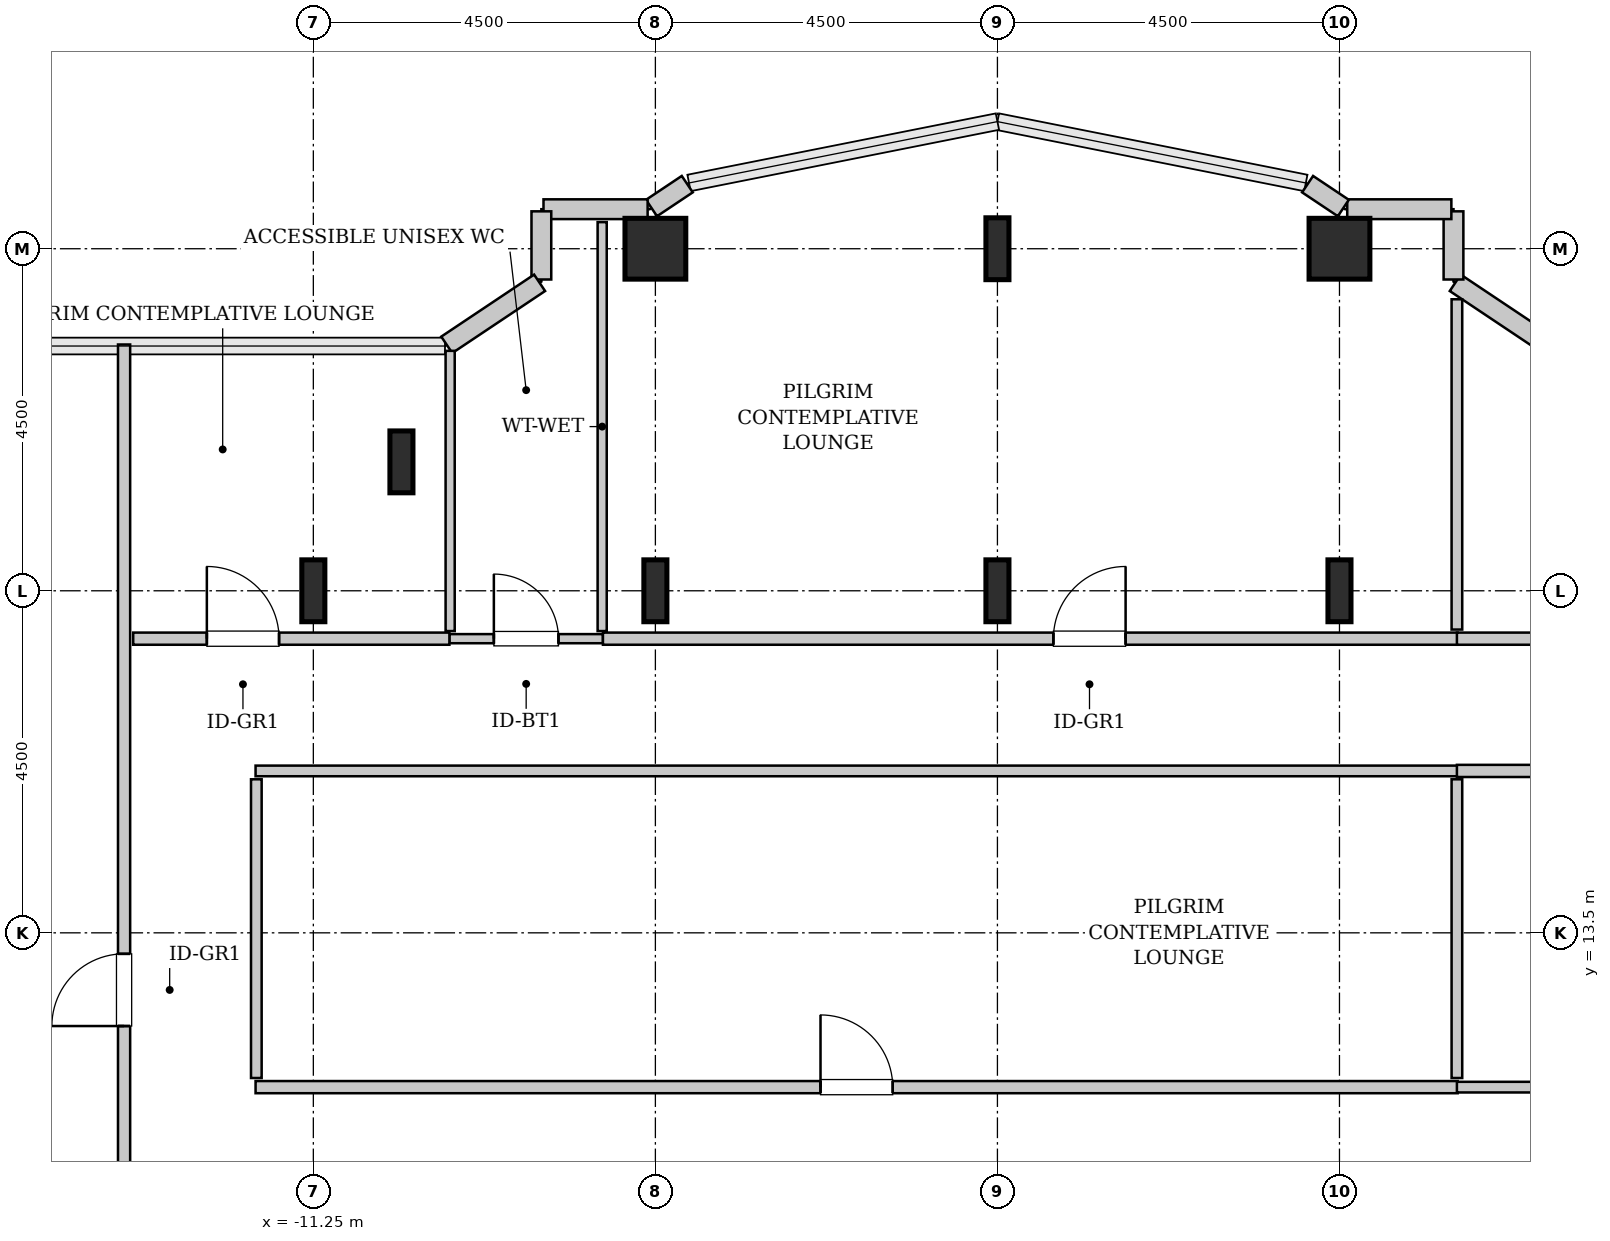
"""IFC4 building model, lengths in metres.
Left out: names, types, materials, properties, quantities, classifications, styles, units other than length and angle.
Written with IfcOpenShell. Run it as: python <this file> out.ifc"""

import sys

from ifc_helpers import new_model, si_unit, direction, frame, frame_2d, origin, origin_2d, place, context, subcontext, project, spatial, rectangle, hollow_rectangle, i_section, extrude, source, transform, mapped, element, fill, save


model = new_model("IFC4")
c1 = context("Model", 3, precision=1e-05, world=origin(), true_north=direction((0.0, 1.0)))
c2 = subcontext(c1, "Body", "Model", "MODEL_VIEW")
j1 = project(units=[si_unit("LENGTHUNIT", "METRE"), si_unit("PLANEANGLEUNIT", "RADIAN")], contexts=[c1])
p1 = place(None, origin())
s1 = spatial("IfcSite", under=j1, at=p1, CompositionType="ELEMENT")
p2 = place(p1, origin())
s2 = spatial("IfcBuilding", under=s1, at=p2, CompositionType="ELEMENT")
p3 = place(p2, frame((0.0, 0.0, 198.2)))
s3 = spatial("IfcBuildingStorey", under=s2, at=p3, CompositionType="ELEMENT", Elevation=198.2)
m1 = source(origin(), c2, "Body", "SweptSolid", [
    extrude(i_section(OverallWidth=0.303, OverallDepth=0.814, WebThickness=0.021, FlangeThickness=0.04, FilletRadius=0.03, at=origin_2d()), origin(), (0.0, 0.0, 1.0), 3.8),
])
for number, where, z_axis, x_axis in (
    (1, (-11.25, 18.0, 0.0), (0.0, 0.0, 1.0), (1.0, 0.0, 0.0)),
    (2, (-10.091, 19.696, 0.0), (0.0, 0.0, 1.0), (1.0, 0.0, 0.0)),
    (3, (-6.75, 18.0, 0.0), (0.0, 0.0, 1.0), (1.0, 0.0, 0.0)),
):
    element("IfcColumn", number, at=place(p3, frame(where, z_axis=z_axis, x_axis=x_axis)), inside=s3, PredefinedType="COLUMN", context=c2, shape_type="MappedRepresentation", body=[
        mapped(m1, transform((0.0, 0.0, 0.0), x_axis=(1.0, 0.0, 0.0), y_axis=(0.0, 1.0, 0.0), z_axis=(0.0, 0.0, 1.0), scale=1.0)),
    ])
m2 = source(origin(), c2, "Body", "SweptSolid", [
    extrude(hollow_rectangle(XDim=0.8, YDim=0.8, WallThickness=0.04, InnerFilletRadius=0.04, OuterFilletRadius=0.08, at=origin_2d()), origin(), (0.0, 0.0, 1.0), 3.8),
])
p4 = place(p3, frame((-6.75, 22.5, 0.0), z_axis=(0.0, 0.0, 1.0), x_axis=(1.0, 0.0, 0.0)))
e4 = element("IfcColumn", 4, at=p4, inside=s3, PredefinedType="COLUMN", context=c2, shape_type="MappedRepresentation", body=[
    mapped(m2, transform((0.0, 0.0, 0.0), x_axis=(1.0, 0.0, 0.0), y_axis=(0.0, 1.0, 0.0), z_axis=(0.0, 0.0, 1.0), scale=1.0)),
])
for number, where, z_axis, x_axis in (
    (5, (-2.25, 18.0, 0.0), (0.0, 0.0, 1.0), (1.0, 0.0, 0.0)),
    (6, (-2.25, 22.5, 0.0), (0.0, 0.0, 1.0), (1.0, 0.0, 0.0)),
    (7, (2.25, 18.0, 0.0), (0.0, 0.0, 1.0), (1.0, 0.0, 0.0)),
):
    element("IfcColumn", number, at=place(p3, frame(where, z_axis=z_axis, x_axis=x_axis)), inside=s3, PredefinedType="COLUMN", context=c2, shape_type="MappedRepresentation", body=[
        mapped(m1, transform((0.0, 0.0, 0.0), x_axis=(1.0, 0.0, 0.0), y_axis=(0.0, 1.0, 0.0), z_axis=(0.0, 0.0, 1.0), scale=1.0)),
    ])
p5 = place(p3, frame((2.25, 22.5, 0.0), z_axis=(0.0, 0.0, 1.0), x_axis=(1.0, 0.0, 0.0)))
e8 = element("IfcColumn", 8, at=p5, inside=s3, PredefinedType="COLUMN", context=c2, shape_type="MappedRepresentation", body=[
    mapped(m2, transform((0.0, 0.0, 0.0), x_axis=(1.0, 0.0, 0.0), y_axis=(0.0, 1.0, 0.0), z_axis=(0.0, 0.0, 1.0), scale=1.0)),
])
m3 = source(origin(), c2, "Body", "SweptSolid", [
    extrude(rectangle(XDim=1.469, YDim=0.26, at=frame_2d((0.734, 0.0))), origin(), (0.0, 0.0, 1.0), 3.5),
])
p6 = place(p3, frame((4.995, 21.236, 0.0), z_axis=(0.0, 0.0, 1.0), x_axis=(-0.831461760506, 0.555581983884, 0.0)))
e9 = element("IfcWall", 9, at=p6, inside=s3, PredefinedType="SOLIDWALL", context=c2, shape_type="MappedRepresentation", body=[
    mapped(m3, transform((0.0, 0.0, 0.0), x_axis=(1.0, 0.0, 0.0), y_axis=(0.0, 1.0, 0.0), z_axis=(0.0, 0.0, 1.0), scale=1.0)),
])
m4 = source(origin(), c2, "Body", "SweptSolid", [
    extrude(rectangle(XDim=0.897, YDim=0.26, at=frame_2d((0.448, 0.0))), origin(), (0.0, 0.0, 1.0), 3.5),
])
p7 = place(p3, frame((3.75, 22.095, 0.0), z_axis=(0.0, 0.0, 1.0), x_axis=(0.0, 1.0, 0.0)))
e10 = element("IfcWall", 10, at=p7, inside=s3, PredefinedType="SOLIDWALL", context=c2, shape_type="MappedRepresentation", body=[
    mapped(m4, transform((0.0, 0.0, 0.0), x_axis=(1.0, 0.0, 0.0), y_axis=(0.0, 1.0, 0.0), z_axis=(0.0, 0.0, 1.0), scale=1.0)),
])
m5 = source(origin(), c2, "Body", "SweptSolid", [
    extrude(rectangle(XDim=1.37, YDim=0.26, at=frame_2d((0.685, 0.0))), origin(), (0.0, 0.0, 1.0), 3.5),
])
p8 = place(p3, frame((3.722, 23.02, 0.0), z_axis=(0.0, 0.0, 1.0), x_axis=(-1.0, 0.0, 0.0)))
e11 = element("IfcWall", 11, at=p8, inside=s3, PredefinedType="SOLIDWALL", context=c2, shape_type="MappedRepresentation", body=[
    mapped(m5, transform((0.0, 0.0, 0.0), x_axis=(1.0, 0.0, 0.0), y_axis=(0.0, 1.0, 0.0), z_axis=(0.0, 0.0, 1.0), scale=1.0)),
])
m6 = source(origin(), c2, "Body", "SweptSolid", [
    extrude(rectangle(XDim=0.565, YDim=0.26, at=frame_2d((0.283, 0.0))), origin(), (0.0, 0.0, 1.0), 3.5),
])
for number, where, z_axis, x_axis in (
    (12, (2.301, 23.036, 0.0), (0.0, 0.0, 1.0), (-0.832, 0.555, 0.0)),
    (13, (-6.331, 23.35, 0.0), (0.0, 0.0, 1.0), (-0.832, -0.555, 0.0)),
):
    element("IfcWall", number, at=place(p3, frame(where, z_axis=z_axis, x_axis=x_axis)), inside=s3, PredefinedType="SOLIDWALL", context=c2, shape_type="MappedRepresentation", body=[
        mapped(m6, transform((0.0, 0.0, 0.0), x_axis=(1.0, 0.0, 0.0), y_axis=(0.0, 1.0, 0.0), z_axis=(0.0, 0.0, 1.0), scale=1.0)),
    ])
p9 = place(p3, frame((-6.852, 23.02, 0.0), z_axis=(0.0, 0.0, 1.0), x_axis=(-1.0, 0.0, 0.0)))
e14 = element("IfcWall", 14, at=p9, inside=s3, PredefinedType="SOLIDWALL", context=c2, shape_type="MappedRepresentation", body=[
    mapped(m5, transform((0.0, 0.0, 0.0), x_axis=(1.0, 0.0, 0.0), y_axis=(0.0, 1.0, 0.0), z_axis=(0.0, 0.0, 1.0), scale=1.0)),
])
p10 = place(p3, frame((-8.25, 22.992, 0.0), z_axis=(0.0, 0.0, 1.0), x_axis=(0.0, -1.0, 0.0)))
e15 = element("IfcWall", 15, at=p10, inside=s3, PredefinedType="SOLIDWALL", context=c2, shape_type="MappedRepresentation", body=[
    mapped(m4, transform((0.0, 0.0, 0.0), x_axis=(1.0, 0.0, 0.0), y_axis=(0.0, 1.0, 0.0), z_axis=(0.0, 0.0, 1.0), scale=1.0)),
])
p11 = place(p3, frame((-8.273, 22.052, 0.0), z_axis=(0.0, 0.0, 1.0), x_axis=(-0.831461760506, -0.555581983884, 0.0)))
e16 = element("IfcWall", 16, at=p11, inside=s3, PredefinedType="SOLIDWALL", context=c2, shape_type="MappedRepresentation", body=[
    mapped(m3, transform((0.0, 0.0, 0.0), x_axis=(1.0, 0.0, 0.0), y_axis=(0.0, 1.0, 0.0), z_axis=(0.0, 0.0, 1.0), scale=1.0)),
])
m7 = source(origin(), c2, "Body", "SweptSolid", [
    extrude(rectangle(XDim=2.02, YDim=0.12, at=frame_2d((1.01, 0.0))), origin(), (0.0, 0.0, 1.0), 3.485),
])
p12 = place(p3, frame((-9.46, 17.37, 0.0), z_axis=(0.0, 0.0, 1.0), x_axis=(1.0, 0.0, 0.0)))
e17 = element("IfcWall", 17, at=p12, inside=s3, PredefinedType="PLUMBINGWALL", context=c2, shape_type="MappedRepresentation", body=[
    mapped(m7, transform((0.0, 0.0, 0.0), x_axis=(1.0, 0.0, 0.0), y_axis=(0.0, 1.0, 0.0), z_axis=(0.0, 0.0, 1.0), scale=1.0)),
])
p13 = place(p12, frame((0.585, 0.0, 0.0)))
e18 = element("IfcOpeningElement", 18, at=p13, cuts=e17, PredefinedType="OPENING", context=c2, shape_type="SweptSolid", body=[
    extrude(rectangle(XDim=0.85, YDim=2.1, at=frame_2d((0.425, 1.05))), frame((0.0, 0.07, 0.0), z_axis=(0.0, -1.0, 0.0), x_axis=(1.0, 0.0, 0.0)), (0.0, 0.0, 1.0), 0.14),
])
m8 = source(origin(), c2, "Body", "SweptSolid", [
    extrude(rectangle(XDim=5.38, YDim=0.12, at=frame_2d((2.69, 0.0))), origin(), (0.0, 0.0, 1.0), 3.485),
])
p14 = place(p3, frame((-7.45, 17.47, 0.0), z_axis=(0.0, 0.0, 1.0), x_axis=(0.0, 1.0, 0.0)))
e19 = element("IfcWall", 19, at=p14, inside=s3, PredefinedType="PLUMBINGWALL", context=c2, shape_type="MappedRepresentation", body=[
    mapped(m8, transform((0.0, 0.0, 0.0), x_axis=(1.0, 0.0, 0.0), y_axis=(0.0, 1.0, 0.0), z_axis=(0.0, 0.0, 1.0), scale=1.0)),
])
m9 = source(origin(), c2, "Body", "SweptSolid", [
    extrude(rectangle(XDim=3.687, YDim=0.12, at=frame_2d((1.843, 0.0))), origin(), (0.0, 0.0, 1.0), 3.485),
])
p15 = place(p3, frame((-9.45, 17.47, 0.0), z_axis=(0.0, 0.0, 1.0), x_axis=(0.0, 1.0, 0.0)))
e20 = element("IfcWall", 20, at=p15, inside=s3, PredefinedType="PLUMBINGWALL", context=c2, shape_type="MappedRepresentation", body=[
    mapped(m9, transform((0.0, 0.0, 0.0), x_axis=(1.0, 0.0, 0.0), y_axis=(0.0, 1.0, 0.0), z_axis=(0.0, 0.0, 1.0), scale=1.0)),
])
m10 = source(origin(), c2, "Body", "SweptSolid", [
    extrude(rectangle(XDim=13.153, YDim=0.16, at=frame_2d((6.576, 0.0))), origin(), (0.0, 0.0, 1.0), 3.485),
])
p16 = place(p3, frame((-13.74, 8.087, 0.0), z_axis=(0.0, 0.0, 1.0), x_axis=(0.0, 1.0, 0.0)))
e21 = element("IfcWall", 21, at=p16, inside=s3, PredefinedType="PARTITIONING", context=c2, shape_type="MappedRepresentation", body=[
    mapped(m10, transform((0.0, 0.0, 0.0), x_axis=(1.0, 0.0, 0.0), y_axis=(0.0, 1.0, 0.0), z_axis=(0.0, 0.0, 1.0), scale=1.0)),
])
p17 = place(p16, frame((4.186, 0.0, 0.0)))
e22 = element("IfcOpeningElement", 22, at=p17, cuts=e21, PredefinedType="OPENING", context=c2, shape_type="SweptSolid", body=[
    extrude(rectangle(XDim=0.95, YDim=2.1, at=frame_2d((0.475, 1.05))), frame((0.0, 0.09, 0.0), z_axis=(0.0, -1.0, 0.0), x_axis=(1.0, 0.0, 0.0)), (0.0, 0.0, 1.0), 0.18),
])
m11 = source(origin(), c2, "Body", "SweptSolid", [
    extrude(rectangle(XDim=15.815, YDim=0.16, at=frame_2d((7.907, 0.0))), origin(), (0.0, 0.0, 1.0), 3.485),
])
p18 = place(p3, frame((-12.01, 11.47, 0.0), z_axis=(0.0, 0.0, 1.0), x_axis=(1.0, 0.0, 0.0)))
e23 = element("IfcWall", 23, at=p18, inside=s3, PredefinedType="PARTITIONING", context=c2, shape_type="MappedRepresentation", body=[
    mapped(m11, transform((0.0, 0.0, 0.0), x_axis=(1.0, 0.0, 0.0), y_axis=(0.0, 1.0, 0.0), z_axis=(0.0, 0.0, 1.0), scale=1.0)),
])
p19 = place(p18, frame((7.433, 0.0, 0.0)))
e24 = element("IfcOpeningElement", 24, at=p19, cuts=e23, PredefinedType="OPENING", context=c2, shape_type="SweptSolid", body=[
    extrude(rectangle(XDim=0.95, YDim=2.1, at=frame_2d((0.475, 1.05))), frame((0.0, 0.09, 0.0), z_axis=(0.0, -1.0, 0.0), x_axis=(1.0, 0.0, 0.0)), (0.0, 0.0, 1.0), 0.18),
])
m12 = source(origin(), c2, "Body", "SweptSolid", [
    extrude(rectangle(XDim=15.815, YDim=0.14, at=frame_2d((7.907, 0.0))), origin(), (0.0, 0.0, 1.0), 3.485),
])
p20 = place(p3, frame((-12.01, 15.63, 0.0), z_axis=(0.0, 0.0, 1.0), x_axis=(1.0, 0.0, 0.0)))
e25 = element("IfcWall", 25, at=p20, inside=s3, PredefinedType="PARTITIONING", context=c2, shape_type="MappedRepresentation", body=[
    mapped(m12, transform((0.0, 0.0, 0.0), x_axis=(1.0, 0.0, 0.0), y_axis=(0.0, 1.0, 0.0), z_axis=(0.0, 0.0, 1.0), scale=1.0)),
])
m13 = source(origin(), c2, "Body", "SweptSolid", [
    extrude(rectangle(XDim=3.93, YDim=0.14, at=frame_2d((1.965, 0.0))), origin(), (0.0, 0.0, 1.0), 3.485),
])
for number, where, z_axis, x_axis in (
    (26, (-12.0, 11.59, 0.0), (0.0, 0.0, 1.0), (0.0, 1.0, 0.0)),
    (27, (3.795, 11.59, 0.0), (0.0, 0.0, 1.0), (0.0, 1.0, 0.0)),
):
    element("IfcWall", number, at=place(p3, frame(where, z_axis=z_axis, x_axis=x_axis)), inside=s3, PredefinedType="PARTITIONING", context=c2, shape_type="MappedRepresentation", body=[
        mapped(m13, transform((0.0, 0.0, 0.0), x_axis=(1.0, 0.0, 0.0), y_axis=(0.0, 1.0, 0.0), z_axis=(0.0, 0.0, 1.0), scale=1.0)),
    ])
m14 = source(origin(), c2, "Body", "SweptSolid", [
    extrude(rectangle(XDim=11.245, YDim=0.16, at=frame_2d((5.623, 0.0))), origin(), (0.0, 0.0, 1.0), 3.485),
])
p21 = place(p3, frame((-7.44, 17.37, 0.0), z_axis=(0.0, 0.0, 1.0), x_axis=(1.0, 0.0, 0.0)))
e28 = element("IfcWall", 28, at=p21, inside=s3, PredefinedType="PARTITIONING", context=c2, shape_type="MappedRepresentation", body=[
    mapped(m14, transform((0.0, 0.0, 0.0), x_axis=(1.0, 0.0, 0.0), y_axis=(0.0, 1.0, 0.0), z_axis=(0.0, 0.0, 1.0), scale=1.0)),
])
p22 = place(p21, frame((5.926, 0.0, 0.0)))
e29 = element("IfcOpeningElement", 29, at=p22, cuts=e28, PredefinedType="OPENING", context=c2, shape_type="SweptSolid", body=[
    extrude(rectangle(XDim=0.95, YDim=2.1, at=frame_2d((0.475, 1.05))), frame((0.0, 0.09, 0.0), z_axis=(0.0, -1.0, 0.0), x_axis=(1.0, 0.0, 0.0)), (0.0, 0.0, 1.0), 0.18),
])
m15 = source(origin(), c2, "Body", "SweptSolid", [
    extrude(rectangle(XDim=4.345, YDim=0.14, at=frame_2d((2.173, 0.0))), origin(), (0.0, 0.0, 1.0), 3.485),
])
p23 = place(p3, frame((3.795, 17.49, 0.0), z_axis=(0.0, 0.0, 1.0), x_axis=(0.0, 1.0, 0.0)))
e30 = element("IfcWall", 30, at=p23, inside=s3, PredefinedType="PARTITIONING", context=c2, shape_type="MappedRepresentation", body=[
    mapped(m15, transform((0.0, 0.0, 0.0), x_axis=(1.0, 0.0, 0.0), y_axis=(0.0, 1.0, 0.0), z_axis=(0.0, 0.0, 1.0), scale=1.0)),
])
m16 = source(origin(), c2, "Body", "SweptSolid", [
    extrude(rectangle(XDim=4.16, YDim=0.16, at=frame_2d((2.08, 0.0))), origin(), (0.0, 0.0, 1.0), 3.485),
])
p24 = place(p3, frame((-13.62, 17.37, 0.0), z_axis=(0.0, 0.0, 1.0), x_axis=(1.0, 0.0, 0.0)))
e31 = element("IfcWall", 31, at=p24, inside=s3, PredefinedType="PARTITIONING", context=c2, shape_type="MappedRepresentation", body=[
    mapped(m16, transform((0.0, 0.0, 0.0), x_axis=(1.0, 0.0, 0.0), y_axis=(0.0, 1.0, 0.0), z_axis=(0.0, 0.0, 1.0), scale=1.0)),
])
p25 = place(p24, frame((0.969, 0.0, 0.0)))
e32 = element("IfcOpeningElement", 32, at=p25, cuts=e31, PredefinedType="OPENING", context=c2, shape_type="SweptSolid", body=[
    extrude(rectangle(XDim=0.95, YDim=2.1, at=frame_2d((0.475, 1.05))), frame((0.0, 0.09, 0.0), z_axis=(0.0, -1.0, 0.0), x_axis=(1.0, 0.0, 0.0)), (0.0, 0.0, 1.0), 0.18),
])
m17 = source(origin(), c2, "Body", "SweptSolid", [
    extrude(rectangle(XDim=9.825, YDim=0.16, at=frame_2d((4.913, 0.0))), origin(), (0.0, 0.0, 1.0), 3.485),
])
p26 = place(p3, frame((3.795, 17.37, 0.0), z_axis=(0.0, 0.0, 1.0), x_axis=(1.0, 0.0, 0.0)))
e33 = element("IfcWall", 33, at=p26, inside=s3, PredefinedType="PARTITIONING", context=c2, shape_type="MappedRepresentation", body=[
    mapped(m17, transform((0.0, 0.0, 0.0), x_axis=(1.0, 0.0, 0.0), y_axis=(0.0, 1.0, 0.0), z_axis=(0.0, 0.0, 1.0), scale=1.0)),
])
p27 = place(p26, frame((4.438, 0.0, 0.0)))
e34 = element("IfcOpeningElement", 34, at=p27, cuts=e33, PredefinedType="OPENING", context=c2, shape_type="SweptSolid", body=[
    extrude(rectangle(XDim=0.95, YDim=2.1, at=frame_2d((0.475, 1.05))), frame((0.0, 0.09, 0.0), z_axis=(0.0, -1.0, 0.0), x_axis=(1.0, 0.0, 0.0)), (0.0, 0.0, 1.0), 0.18),
])
m18 = source(origin(), c2, "Body", "SweptSolid", [
    extrude(rectangle(XDim=8.215, YDim=0.16, at=frame_2d((4.107, 0.0))), origin(), (0.0, 0.0, 1.0), 3.485),
])
p28 = place(p3, frame((3.795, 15.63, 0.0), z_axis=(0.0, 0.0, 1.0), x_axis=(1.0, 0.0, 0.0)))
e35 = element("IfcWall", 35, at=p28, inside=s3, PredefinedType="PARTITIONING", context=c2, shape_type="MappedRepresentation", body=[
    mapped(m18, transform((0.0, 0.0, 0.0), x_axis=(1.0, 0.0, 0.0), y_axis=(0.0, 1.0, 0.0), z_axis=(0.0, 0.0, 1.0), scale=1.0)),
])
p29 = place(p28, frame((3.633, 0.0, 0.0)))
e36 = element("IfcOpeningElement", 36, at=p29, cuts=e35, PredefinedType="OPENING", context=c2, shape_type="SweptSolid", body=[
    extrude(rectangle(XDim=0.95, YDim=2.1, at=frame_2d((0.475, 1.05))), frame((0.0, 0.09, 0.0), z_axis=(0.0, -1.0, 0.0), x_axis=(1.0, 0.0, 0.0)), (0.0, 0.0, 1.0), 0.18),
])
m19 = source(origin(), c2, "Body", "SweptSolid", [
    extrude(rectangle(XDim=8.215, YDim=0.14, at=frame_2d((4.107, 0.0))), origin(), (0.0, 0.0, 1.0), 3.485),
])
p30 = place(p3, frame((3.795, 11.47, 0.0), z_axis=(0.0, 0.0, 1.0), x_axis=(1.0, 0.0, 0.0)))
e37 = element("IfcWall", 37, at=p30, inside=s3, PredefinedType="PARTITIONING", context=c2, shape_type="MappedRepresentation", body=[
    mapped(m19, transform((0.0, 0.0, 0.0), x_axis=(1.0, 0.0, 0.0), y_axis=(0.0, 1.0, 0.0), z_axis=(0.0, 0.0, 1.0), scale=1.0)),
])
m20 = source(origin(), c2, "Body", "SweptSolid", [
    extrude(rectangle(XDim=0.85, YDim=2.1, at=frame_2d((0.425, 1.05))), frame((0.0, 0.025, 0.0), z_axis=(0.0, -1.0, 0.0), x_axis=(1.0, 0.0, 0.0)), (0.0, 0.0, 1.0), 0.05),
])
p31 = place(p13, origin())
e38 = element("IfcDoor", 38, at=p31, inside=s3, OperationType="SINGLE_SWING_LEFT", PredefinedType="DOOR", context=c2, shape_type="MappedRepresentation", body=[
    mapped(m20, transform((0.0, 0.0, 0.0), x_axis=(1.0, 0.0, 0.0), y_axis=(0.0, 1.0, 0.0), z_axis=(0.0, 0.0, 1.0), scale=1.0)),
])
fill(e18, e38)
m21 = source(origin(), c2, "Body", "SweptSolid", [
    extrude(rectangle(XDim=0.95, YDim=2.1, at=frame_2d((0.475, 1.05))), frame((0.0, 0.025, 0.0), z_axis=(0.0, -1.0, 0.0), x_axis=(1.0, 0.0, 0.0)), (0.0, 0.0, 1.0), 0.05),
])
p32 = place(p17, origin())
e39 = element("IfcDoor", 39, at=p32, inside=s3, OperationType="SINGLE_SWING_LEFT", PredefinedType="DOOR", context=c2, shape_type="MappedRepresentation", body=[
    mapped(m21, transform((0.0, 0.0, 0.0), x_axis=(1.0, 0.0, 0.0), y_axis=(0.0, 1.0, 0.0), z_axis=(0.0, 0.0, 1.0), scale=1.0)),
])
fill(e22, e39)
p33 = place(p19, origin())
e40 = element("IfcDoor", 40, at=p33, inside=s3, OperationType="SINGLE_SWING_LEFT", PredefinedType="DOOR", context=c2, shape_type="MappedRepresentation", body=[
    mapped(m21, transform((0.0, 0.0, 0.0), x_axis=(1.0, 0.0, 0.0), y_axis=(0.0, 1.0, 0.0), z_axis=(0.0, 0.0, 1.0), scale=1.0)),
])
fill(e24, e40)
p34 = place(p22, origin())
e41 = element("IfcDoor", 41, at=p34, inside=s3, OperationType="SINGLE_SWING_RIGHT", PredefinedType="DOOR", context=c2, shape_type="MappedRepresentation", body=[
    mapped(m21, transform((0.0, 0.0, 0.0), x_axis=(1.0, 0.0, 0.0), y_axis=(0.0, 1.0, 0.0), z_axis=(0.0, 0.0, 1.0), scale=1.0)),
])
fill(e29, e41)
p35 = place(p25, origin())
e42 = element("IfcDoor", 42, at=p35, inside=s3, OperationType="SINGLE_SWING_LEFT", PredefinedType="DOOR", context=c2, shape_type="MappedRepresentation", body=[
    mapped(m21, transform((0.0, 0.0, 0.0), x_axis=(1.0, 0.0, 0.0), y_axis=(0.0, 1.0, 0.0), z_axis=(0.0, 0.0, 1.0), scale=1.0)),
])
fill(e32, e42)
save(model, sys.argv[1])
